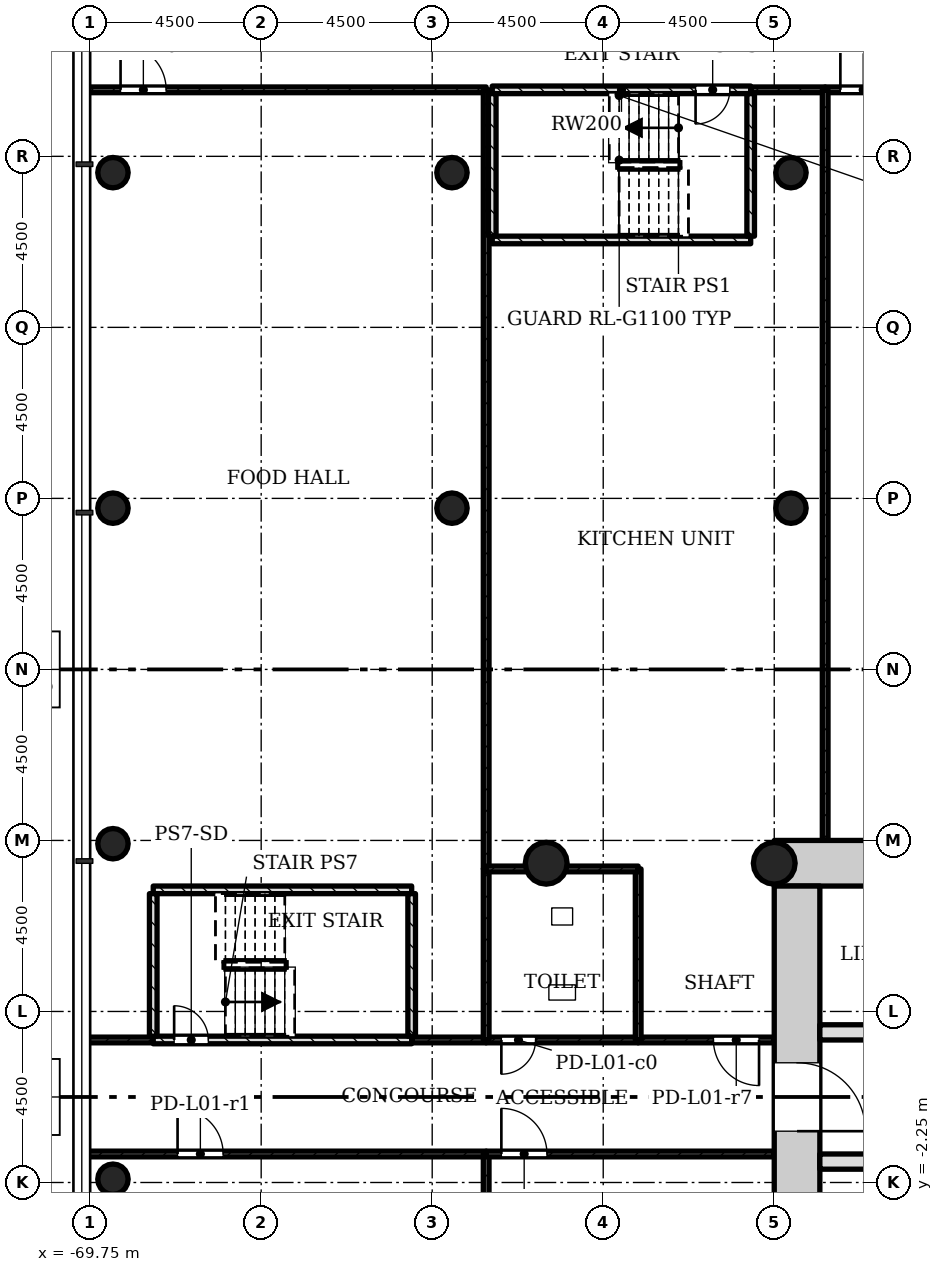
"""IFC4 building model, lengths in metres.
Left out: names, types, materials, properties, quantities, classifications, styles, units other than length and angle.
Written with IfcOpenShell. Run it as: python <this file> out.ifc"""

import sys

from ifc_helpers import new_model, si_unit, direction, frame, frame_2d, origin, origin_2d, place, context, subcontext, project, spatial, rectangle, hollow_circle, extrude, element, fill, save


model = new_model("IFC4")
c1 = context("Model", 3, precision=1e-05, world=origin(), true_north=direction((0.0, 1.0)))
c2 = subcontext(c1, "Body", "Model", "MODEL_VIEW")
j1 = project(units=[si_unit("LENGTHUNIT", "METRE"), si_unit("PLANEANGLEUNIT", "RADIAN")], contexts=[c1])
p1 = place(None, origin())
s1 = spatial("IfcSite", under=j1, at=p1, CompositionType="ELEMENT")
p2 = place(p1, origin())
s2 = spatial("IfcBuilding", under=s1, at=p2, CompositionType="ELEMENT")
p3 = place(p2, frame((0.0, 0.0, 6.0)))
s3 = spatial("IfcBuildingStorey", under=s2, at=p3, CompositionType="ELEMENT", Elevation=6.0)
p4 = place(p3, frame((-43.95, 6.15, 0.0), z_axis=(0.0, 0.0, 1.0), x_axis=(-1.0, 0.0, 0.0)))
e1 = element("IfcWall", 1, at=p4, inside=s3, PredefinedType="SHEAR", context=c2, shape_type="SweptSolid", body=[
    extrude(rectangle(XDim=7.8, YDim=1.2, at=frame_2d((3.9, 0.0))), origin(), (0.0, 0.0, 1.0), 5.0),
])
p5 = place(p3, frame((-51.15, 5.55, 0.0), z_axis=(0.0, 0.0, 1.0), x_axis=(0.0, -1.0, 0.0)))
e2 = element("IfcWall", 2, at=p5, inside=s3, PredefinedType="SHEAR", context=c2, shape_type="SweptSolid", body=[
    extrude(rectangle(XDim=12.3, YDim=1.2, at=frame_2d((6.15, 0.0))), origin(), (0.0, 0.0, 1.0), 5.0),
])
p6 = place(p5, frame((4.65, 0.0, 0.0)))
e3 = element("IfcOpeningElement", 3, at=p6, cuts=e2, PredefinedType="OPENING", context=c2, shape_type="SweptSolid", body=[
    extrude(rectangle(XDim=1.8, YDim=2.1, at=frame_2d((0.9, 1.05))), frame((0.0, 0.61, 0.0), z_axis=(0.0, -1.0, 0.0), x_axis=(1.0, 0.0, 0.0)), (0.0, 0.0, 1.0), 1.22),
])
p7 = place(p3, frame((-50.55, -1.7, 0.0), z_axis=(0.0, 0.0, 1.0), x_axis=(1.0, 0.0, 0.0)))
e4 = element("IfcWall", 4, at=p7, inside=s3, PredefinedType="SHEAR", context=c2, shape_type="SweptSolid", body=[
    extrude(rectangle(XDim=6.6, YDim=0.4, at=frame_2d((3.3, 0.0))), origin(), (0.0, 0.0, 1.0), 5.0),
])
p8 = place(p7, frame((5.25, 0.0, 0.0)))
e5 = element("IfcOpeningElement", 5, at=p8, cuts=e4, PredefinedType="OPENING", context=c2, shape_type="SweptSolid", body=[
    extrude(rectangle(XDim=0.9, YDim=2.1, at=frame_2d((0.45, 1.05))), frame((0.0, 0.21, 0.0), z_axis=(0.0, -1.0, 0.0), x_axis=(1.0, 0.0, 0.0)), (0.0, 0.0, 1.0), 0.42),
])
p9 = place(p3, frame((-50.55, 1.7, 0.0), z_axis=(0.0, 0.0, 1.0), x_axis=(1.0, 0.0, 0.0)))
e6 = element("IfcWall", 6, at=p9, inside=s3, PredefinedType="SHEAR", context=c2, shape_type="SweptSolid", body=[
    extrude(rectangle(XDim=6.6, YDim=0.4, at=frame_2d((3.3, 0.0))), origin(), (0.0, 0.0, 1.0), 5.0),
])
p10 = place(p9, frame((4.95, 0.0, 0.0)))
e7 = element("IfcOpeningElement", 7, at=p10, cuts=e6, PredefinedType="OPENING", context=c2, shape_type="SweptSolid", body=[
    extrude(rectangle(XDim=1.1, YDim=2.1, at=frame_2d((0.55, 1.05))), frame((0.0, 0.21, 0.0), z_axis=(0.0, -1.0, 0.0), x_axis=(1.0, 0.0, 0.0)), (0.0, 0.0, 1.0), 0.42),
])
for number, where, z_axis, x_axis in (
    (8, (-51.75, 6.15, 0.0), (0.0, 0.0, 1.0), (1.0, 0.0, 0.0)),
    (9, (-57.75, 6.15, 0.0), (0.0, 0.0, 1.0), (1.0, 0.0, 0.0)),
):
    element("IfcColumn", number, at=place(p3, frame(where, z_axis=z_axis, x_axis=x_axis)), inside=s3, PredefinedType="COLUMN", context=c2, shape_type="SweptSolid", body=[
        extrude(hollow_circle(Radius=0.55, WallThickness=0.04, at=origin_2d()), origin(), (0.0, 0.0, 1.0), 5.0),
    ])
for number, where, z_axis, x_axis in (
    (10, (-69.15, -2.164, 0.0), (0.0, 0.0, 1.0), (1.0, 0.0, 0.0)),
    (11, (-69.15, 6.664, 0.0), (0.0, 0.0, 1.0), (1.0, 0.0, 0.0)),
    (12, (-69.15, 15.493, 0.0), (0.0, 0.0, 1.0), (1.0, 0.0, 0.0)),
    (13, (-60.23, 15.493, 0.0), (0.0, 0.0, 1.0), (1.0, 0.0, 0.0)),
    (14, (-51.31, 15.493, 0.0), (0.0, 0.0, 1.0), (1.0, 0.0, 0.0)),
    (15, (-69.15, 24.321, 0.0), (0.0, 0.0, 1.0), (1.0, 0.0, 0.0)),
    (16, (-60.23, 24.321, 0.0), (0.0, 0.0, 1.0), (1.0, 0.0, 0.0)),
    (17, (-51.31, 24.321, 0.0), (0.0, 0.0, 1.0), (1.0, 0.0, 0.0)),
):
    element("IfcColumn", number, at=place(p3, frame(where, z_axis=z_axis, x_axis=x_axis)), inside=s3, PredefinedType="COLUMN", context=c2, shape_type="SweptSolid", body=[
        extrude(hollow_circle(Radius=0.4, WallThickness=0.028, at=origin_2d()), origin(), (0.0, 0.0, 1.0), 5.0),
    ])
p11 = place(p3, frame((-69.85, -1.5, 0.0), z_axis=(0.0, 0.0, 1.0), x_axis=(1.0, 0.0, 0.0)))
e18 = element("IfcWall", 18, at=p11, inside=s3, PredefinedType="PARTITIONING", context=c2, shape_type="SweptSolid", body=[
    extrude(rectangle(XDim=10.52, YDim=0.15, at=frame_2d((5.26, 0.0))), origin(), (0.0, 0.0, 1.0), 4.58),
])
p12 = place(p11, frame((2.4, 0.0, 0.0)))
e19 = element("IfcOpeningElement", 19, at=p12, cuts=e18, PredefinedType="OPENING", context=c2, shape_type="SweptSolid", body=[
    extrude(rectangle(XDim=1.2, YDim=2.1, at=frame_2d((0.6, 1.05))), frame((0.0, 0.085, 0.0), z_axis=(0.0, -1.0, 0.0), x_axis=(1.0, 0.0, 0.0)), (0.0, 0.0, 1.0), 0.17),
])
p13 = place(p3, frame((-59.33, -1.5, 0.0), z_axis=(0.0, 0.0, 1.0), x_axis=(0.0, -1.0, 0.0)))
e20 = element("IfcWall", 20, at=p13, inside=s3, PredefinedType="PARTITIONING", context=c2, shape_type="SweptSolid", body=[
    extrude(rectangle(XDim=22.0, YDim=0.15, at=frame_2d((11.0, 0.0))), origin(), (0.0, 0.0, 1.0), 4.58),
])
p14 = place(p3, frame((-59.33, 1.5, 0.0), z_axis=(0.0, 0.0, 1.0), x_axis=(-1.0, 0.0, 0.0)))
e21 = element("IfcWall", 21, at=p14, inside=s3, PredefinedType="PARTITIONING", context=c2, shape_type="SweptSolid", body=[
    extrude(rectangle(XDim=1.96, YDim=0.15, at=frame_2d((0.98, 0.0))), origin(), (0.0, 0.0, 1.0), 4.58),
])
p15 = place(p3, frame((-68.09, 1.5, 0.0), z_axis=(0.0, 0.0, 1.0), x_axis=(-1.0, 0.0, 0.0)))
e22 = element("IfcWall", 22, at=p15, inside=s3, PredefinedType="PARTITIONING", context=c2, shape_type="SweptSolid", body=[
    extrude(rectangle(XDim=1.76, YDim=0.15, at=frame_2d((0.88, 0.0))), origin(), (0.0, 0.0, 1.0), 4.58),
])
p16 = place(p3, frame((-69.85, 26.5, 0.0), z_axis=(0.0, 0.0, 1.0), x_axis=(1.0, 0.0, 0.0)))
e23 = element("IfcWall", 23, at=p16, inside=s3, PredefinedType="PARTITIONING", context=c2, shape_type="SweptSolid", body=[
    extrude(rectangle(XDim=10.52, YDim=0.15, at=frame_2d((5.26, 0.0))), origin(), (0.0, 0.0, 1.0), 4.58),
])
p17 = place(p16, frame((0.9, 0.0, 0.0)))
e24 = element("IfcOpeningElement", 24, at=p17, cuts=e23, PredefinedType="OPENING", context=c2, shape_type="SweptSolid", body=[
    extrude(rectangle(XDim=1.2, YDim=2.1, at=frame_2d((0.6, 1.05))), frame((0.0, 0.085, 0.0), z_axis=(0.0, -1.0, 0.0), x_axis=(1.0, 0.0, 0.0)), (0.0, 0.0, 1.0), 0.17),
])
p18 = place(p3, frame((-59.33, 26.5, 0.0), z_axis=(0.0, 0.0, 1.0), x_axis=(0.0, -1.0, 0.0)))
e25 = element("IfcWall", 25, at=p18, inside=s3, PredefinedType="PARTITIONING", context=c2, shape_type="SweptSolid", body=[
    extrude(rectangle(XDim=20.5, YDim=0.15, at=frame_2d((10.25, 0.0))), origin(), (0.0, 0.0, 1.0), 4.58),
])
p19 = place(p3, frame((-59.33, -1.5, 0.0), z_axis=(0.0, 0.0, 1.0), x_axis=(1.0, 0.0, 0.0)))
e26 = element("IfcWall", 26, at=p19, inside=s3, PredefinedType="PARTITIONING", context=c2, shape_type="SweptSolid", body=[
    extrude(rectangle(XDim=7.58, YDim=0.15, at=frame_2d((3.79, 0.0))), origin(), (0.0, 0.0, 1.0), 4.58),
])
p20 = place(p19, frame((0.4, 0.0, 0.0)))
e27 = element("IfcOpeningElement", 27, at=p20, cuts=e26, PredefinedType="OPENING", context=c2, shape_type="SweptSolid", body=[
    extrude(rectangle(XDim=1.2, YDim=2.1, at=frame_2d((0.6, 1.05))), frame((0.0, 0.085, 0.0), z_axis=(0.0, -1.0, 0.0), x_axis=(1.0, 0.0, 0.0)), (0.0, 0.0, 1.0), 0.17),
])
p21 = place(p3, frame((-51.75, 1.5, 0.0), z_axis=(0.0, 0.0, 1.0), x_axis=(-1.0, 0.0, 0.0)))
e28 = element("IfcWall", 28, at=p21, inside=s3, PredefinedType="PARTITIONING", context=c2, shape_type="SweptSolid", body=[
    extrude(rectangle(XDim=3.58, YDim=0.15, at=frame_2d((1.79, 0.0))), origin(), (0.0, 0.0, 1.0), 4.58),
])
p22 = place(p21, frame((0.4, 0.0, 0.0)))
e29 = element("IfcOpeningElement", 29, at=p22, cuts=e28, PredefinedType="OPENING", context=c2, shape_type="SweptSolid", body=[
    extrude(rectangle(XDim=1.2, YDim=2.1, at=frame_2d((0.6, 1.05))), frame((0.0, 0.085, 0.0), z_axis=(0.0, -1.0, 0.0), x_axis=(1.0, 0.0, 0.0)), (0.0, 0.0, 1.0), 0.17),
])
p23 = place(p3, frame((-52.37, 26.5, 0.0), z_axis=(0.0, 0.0, 1.0), x_axis=(1.0, 0.0, 0.0)))
e30 = element("IfcWall", 30, at=p23, inside=s3, PredefinedType="PARTITIONING", context=c2, shape_type="SweptSolid", body=[
    extrude(rectangle(XDim=1.96, YDim=0.15, at=frame_2d((0.98, 0.0))), origin(), (0.0, 0.0, 1.0), 4.58),
])
p24 = place(p3, frame((-50.41, 26.5, 0.0), z_axis=(0.0, 0.0, 1.0), x_axis=(1.0, 0.0, 0.0)))
e31 = element("IfcWall", 31, at=p24, inside=s3, PredefinedType="PARTITIONING", context=c2, shape_type="SweptSolid", body=[
    extrude(rectangle(XDim=8.92, YDim=0.15, at=frame_2d((4.46, 0.0))), origin(), (0.0, 0.0, 1.0), 4.58),
])
p25 = place(p24, frame((0.4, 0.0, 0.0)))
e32 = element("IfcOpeningElement", 32, at=p25, cuts=e31, PredefinedType="OPENING", context=c2, shape_type="SweptSolid", body=[
    extrude(rectangle(XDim=1.2, YDim=2.1, at=frame_2d((0.6, 1.05))), frame((0.0, 0.085, 0.0), z_axis=(0.0, -1.0, 0.0), x_axis=(1.0, 0.0, 0.0)), (0.0, 0.0, 1.0), 0.17),
])
p26 = place(p3, frame((-50.41, 6.75, 0.0), z_axis=(0.0, 0.0, 1.0), x_axis=(0.0, 1.0, 0.0)))
e33 = element("IfcWall", 33, at=p26, inside=s3, PredefinedType="PARTITIONING", context=c2, shape_type="SweptSolid", body=[
    extrude(rectangle(XDim=19.75, YDim=0.15, at=frame_2d((9.875, 0.0))), origin(), (0.0, 0.0, 1.0), 4.58),
])
p27 = place(p3, frame((-59.33, 1.5, 0.0), z_axis=(0.0, 0.0, 1.0), x_axis=(1.0, 0.0, 0.0)))
e34 = element("IfcWall", 34, at=p27, inside=s3, PredefinedType="PARTITIONING", context=c2, shape_type="SweptSolid", body=[
    extrude(rectangle(XDim=4.0, YDim=0.15, at=frame_2d((2.0, 0.0))), origin(), (0.0, 0.0, 1.0), 4.58),
])
p28 = place(p27, frame((0.4, 0.0, 0.0)))
e35 = element("IfcOpeningElement", 35, at=p28, cuts=e34, PredefinedType="OPENING", context=c2, shape_type="SweptSolid", body=[
    extrude(rectangle(XDim=0.9, YDim=2.1, at=frame_2d((0.45, 1.05))), frame((0.0, 0.085, 0.0), z_axis=(0.0, -1.0, 0.0), x_axis=(1.0, 0.0, 0.0)), (0.0, 0.0, 1.0), 0.17),
])
for number, where, z_axis, x_axis in (
    (36, (-59.33, 6.0, 0.0), (0.0, 0.0, 1.0), (0.0, -1.0, 0.0)),
    (37, (-55.33, 1.5, 0.0), (0.0, 0.0, 1.0), (0.0, 1.0, 0.0)),
):
    element("IfcWall", number, at=place(p3, frame(where, z_axis=z_axis, x_axis=x_axis)), inside=s3, PredefinedType="PARTITIONING", context=c2, shape_type="SweptSolid", body=[
        extrude(rectangle(XDim=4.5, YDim=0.15, at=frame_2d((2.25, 0.0))), origin(), (0.0, 0.0, 1.0), 4.58),
    ])
p29 = place(p3, frame((-55.33, 6.0, 0.0), z_axis=(0.0, 0.0, 1.0), x_axis=(-1.0, 0.0, 0.0)))
e38 = element("IfcWall", 38, at=p29, inside=s3, PredefinedType="PARTITIONING", context=c2, shape_type="SweptSolid", body=[
    extrude(rectangle(XDim=4.0, YDim=0.15, at=frame_2d((2.0, 0.0))), origin(), (0.0, 0.0, 1.0), 4.58),
])
p30 = place(p3, frame((-59.17, 26.5, 0.0), z_axis=(0.0, 0.0, 1.0), x_axis=(1.0, 0.0, 0.0)))
e39 = element("IfcWall", 39, at=p30, inside=s3, PredefinedType="SHEAR", context=c2, shape_type="SweptSolid", body=[
    extrude(rectangle(XDim=6.8, YDim=0.2, at=frame_2d((3.4, 0.0))), origin(), (0.0, 0.0, 1.0), 4.58),
])
p31 = place(p30, frame((5.35, 0.0, 0.0)))
e40 = element("IfcOpeningElement", 40, at=p31, cuts=e39, PredefinedType="OPENING", context=c2, shape_type="SweptSolid", body=[
    extrude(rectangle(XDim=0.9, YDim=2.1, at=frame_2d((0.45, 1.05))), frame((0.0, 0.11, 0.0), z_axis=(0.0, -1.0, 0.0), x_axis=(1.0, 0.0, 0.0)), (0.0, 0.0, 1.0), 0.22),
])
p32 = place(p3, frame((-59.17, 22.55, 0.0), z_axis=(0.0, 0.0, 1.0), x_axis=(1.0, 0.0, 0.0)))
e41 = element("IfcWall", 41, at=p32, inside=s3, PredefinedType="SHEAR", context=c2, shape_type="SweptSolid", body=[
    extrude(rectangle(XDim=6.8, YDim=0.2, at=frame_2d((3.4, 0.0))), origin(), (0.0, 0.0, 1.0), 4.58),
])
for number, where, z_axis, x_axis in (
    (42, (-59.17, 22.65, 0.0), (0.0, 0.0, 1.0), (0.0, 1.0, 0.0)),
    (43, (-52.37, 22.65, 0.0), (0.0, 0.0, 1.0), (0.0, 1.0, 0.0)),
):
    element("IfcWall", number, at=place(p3, frame(where, z_axis=z_axis, x_axis=x_axis)), inside=s3, PredefinedType="SHEAR", context=c2, shape_type="SweptSolid", body=[
        extrude(rectangle(XDim=3.75, YDim=0.2, at=frame_2d((1.875, 0.0))), origin(), (0.0, 0.0, 1.0), 4.58),
    ])
p33 = place(p3, frame((-68.09, 1.5, 0.0), z_axis=(0.0, 0.0, 1.0), x_axis=(1.0, 0.0, 0.0)))
e44 = element("IfcWall", 44, at=p33, inside=s3, PredefinedType="SHEAR", context=c2, shape_type="SweptSolid", body=[
    extrude(rectangle(XDim=6.8, YDim=0.2, at=frame_2d((3.4, 0.0))), origin(), (0.0, 0.0, 1.0), 4.58),
])
p34 = place(p33, frame((0.55, 0.0, 0.0)))
e45 = element("IfcOpeningElement", 45, at=p34, cuts=e44, PredefinedType="OPENING", context=c2, shape_type="SweptSolid", body=[
    extrude(rectangle(XDim=0.9, YDim=2.1, at=frame_2d((0.45, 1.05))), frame((0.0, 0.11, 0.0), z_axis=(0.0, -1.0, 0.0), x_axis=(1.0, 0.0, 0.0)), (0.0, 0.0, 1.0), 0.22),
])
p35 = place(p3, frame((-68.09, 5.45, 0.0), z_axis=(0.0, 0.0, 1.0), x_axis=(1.0, 0.0, 0.0)))
e46 = element("IfcWall", 46, at=p35, inside=s3, PredefinedType="SHEAR", context=c2, shape_type="SweptSolid", body=[
    extrude(rectangle(XDim=6.8, YDim=0.2, at=frame_2d((3.4, 0.0))), origin(), (0.0, 0.0, 1.0), 4.58),
])
for number, where, z_axis, x_axis in (
    (47, (-68.09, 1.6, 0.0), (0.0, 0.0, 1.0), (0.0, 1.0, 0.0)),
    (48, (-61.29, 1.6, 0.0), (0.0, 0.0, 1.0), (0.0, 1.0, 0.0)),
):
    element("IfcWall", number, at=place(p3, frame(where, z_axis=z_axis, x_axis=x_axis)), inside=s3, PredefinedType="SHEAR", context=c2, shape_type="SweptSolid", body=[
        extrude(rectangle(XDim=3.75, YDim=0.2, at=frame_2d((1.875, 0.0))), origin(), (0.0, 0.0, 1.0), 4.58),
    ])
p36 = place(p12, origin())
e49 = element("IfcDoor", 49, at=p36, inside=s3, OperationType="SINGLE_SWING_RIGHT", PredefinedType="DOOR", context=c2, shape_type="SweptSolid", body=[
    extrude(rectangle(XDim=1.2, YDim=2.1, at=frame_2d((0.6, 1.05))), frame((0.0, 0.025, 0.0), z_axis=(0.0, -1.0, 0.0), x_axis=(1.0, 0.0, 0.0)), (0.0, 0.0, 1.0), 0.05),
])
fill(e19, e49)
p37 = place(p17, origin())
e50 = element("IfcDoor", 50, at=p37, inside=s3, OperationType="SINGLE_SWING_RIGHT", PredefinedType="DOOR", context=c2, shape_type="SweptSolid", body=[
    extrude(rectangle(XDim=1.2, YDim=2.1, at=frame_2d((0.6, 1.05))), frame((0.0, 0.025, 0.0), z_axis=(0.0, -1.0, 0.0), x_axis=(1.0, 0.0, 0.0)), (0.0, 0.0, 1.0), 0.05),
])
fill(e24, e50)
p38 = place(p20, origin())
e51 = element("IfcDoor", 51, at=p38, inside=s3, OperationType="SINGLE_SWING_RIGHT", PredefinedType="DOOR", context=c2, shape_type="SweptSolid", body=[
    extrude(rectangle(XDim=1.2, YDim=2.1, at=frame_2d((0.6, 1.05))), frame((0.0, 0.025, 0.0), z_axis=(0.0, -1.0, 0.0), x_axis=(1.0, 0.0, 0.0)), (0.0, 0.0, 1.0), 0.05),
])
fill(e27, e51)
p39 = place(p22, origin())
e52 = element("IfcDoor", 52, at=p39, inside=s3, OperationType="SINGLE_SWING_RIGHT", PredefinedType="DOOR", context=c2, shape_type="SweptSolid", body=[
    extrude(rectangle(XDim=1.2, YDim=2.1, at=frame_2d((0.6, 1.05))), frame((0.0, 0.025, 0.0), z_axis=(0.0, -1.0, 0.0), x_axis=(1.0, 0.0, 0.0)), (0.0, 0.0, 1.0), 0.05),
])
fill(e29, e52)
p40 = place(p25, origin())
e53 = element("IfcDoor", 53, at=p40, inside=s3, OperationType="SINGLE_SWING_RIGHT", PredefinedType="DOOR", context=c2, shape_type="SweptSolid", body=[
    extrude(rectangle(XDim=1.2, YDim=2.1, at=frame_2d((0.6, 1.05))), frame((0.0, 0.025, 0.0), z_axis=(0.0, -1.0, 0.0), x_axis=(1.0, 0.0, 0.0)), (0.0, 0.0, 1.0), 0.05),
])
fill(e32, e53)
p41 = place(p28, origin())
e54 = element("IfcDoor", 54, at=p41, inside=s3, OperationType="SINGLE_SWING_LEFT", PredefinedType="DOOR", context=c2, shape_type="SweptSolid", body=[
    extrude(rectangle(XDim=0.9, YDim=2.1, at=frame_2d((0.45, 1.05))), frame((0.0, 0.025, 0.0), z_axis=(0.0, -1.0, 0.0), x_axis=(1.0, 0.0, 0.0)), (0.0, 0.0, 1.0), 0.05),
])
fill(e35, e54)
p42 = place(p31, origin())
e55 = element("IfcDoor", 55, at=p42, inside=s3, OperationType="SINGLE_SWING_LEFT", PredefinedType="DOOR", context=c2, shape_type="SweptSolid", body=[
    extrude(rectangle(XDim=0.9, YDim=2.1, at=frame_2d((0.45, 1.05))), frame((0.0, 0.025, 0.0), z_axis=(0.0, -1.0, 0.0), x_axis=(1.0, 0.0, 0.0)), (0.0, 0.0, 1.0), 0.05),
])
fill(e40, e55)
p43 = place(p34, origin())
e56 = element("IfcDoor", 56, at=p43, inside=s3, OperationType="SINGLE_SWING_RIGHT", PredefinedType="DOOR", context=c2, shape_type="SweptSolid", body=[
    extrude(rectangle(XDim=0.9, YDim=2.1, at=frame_2d((0.45, 1.05))), frame((0.0, 0.025, 0.0), z_axis=(0.0, -1.0, 0.0), x_axis=(1.0, 0.0, 0.0)), (0.0, 0.0, 1.0), 0.05),
])
fill(e45, e56)
p44 = place(p6, origin())
e57 = element("IfcDoor", 57, at=p44, inside=s3, OperationType="SINGLE_SWING_LEFT", PredefinedType="DOOR", context=c2, shape_type="SweptSolid", body=[
    extrude(rectangle(XDim=1.8, YDim=2.1, at=frame_2d((0.9, 1.05))), frame((0.0, 0.025, 0.0), z_axis=(0.0, -1.0, 0.0), x_axis=(1.0, 0.0, 0.0)), (0.0, 0.0, 1.0), 0.05),
])
fill(e3, e57)
save(model, sys.argv[1])
